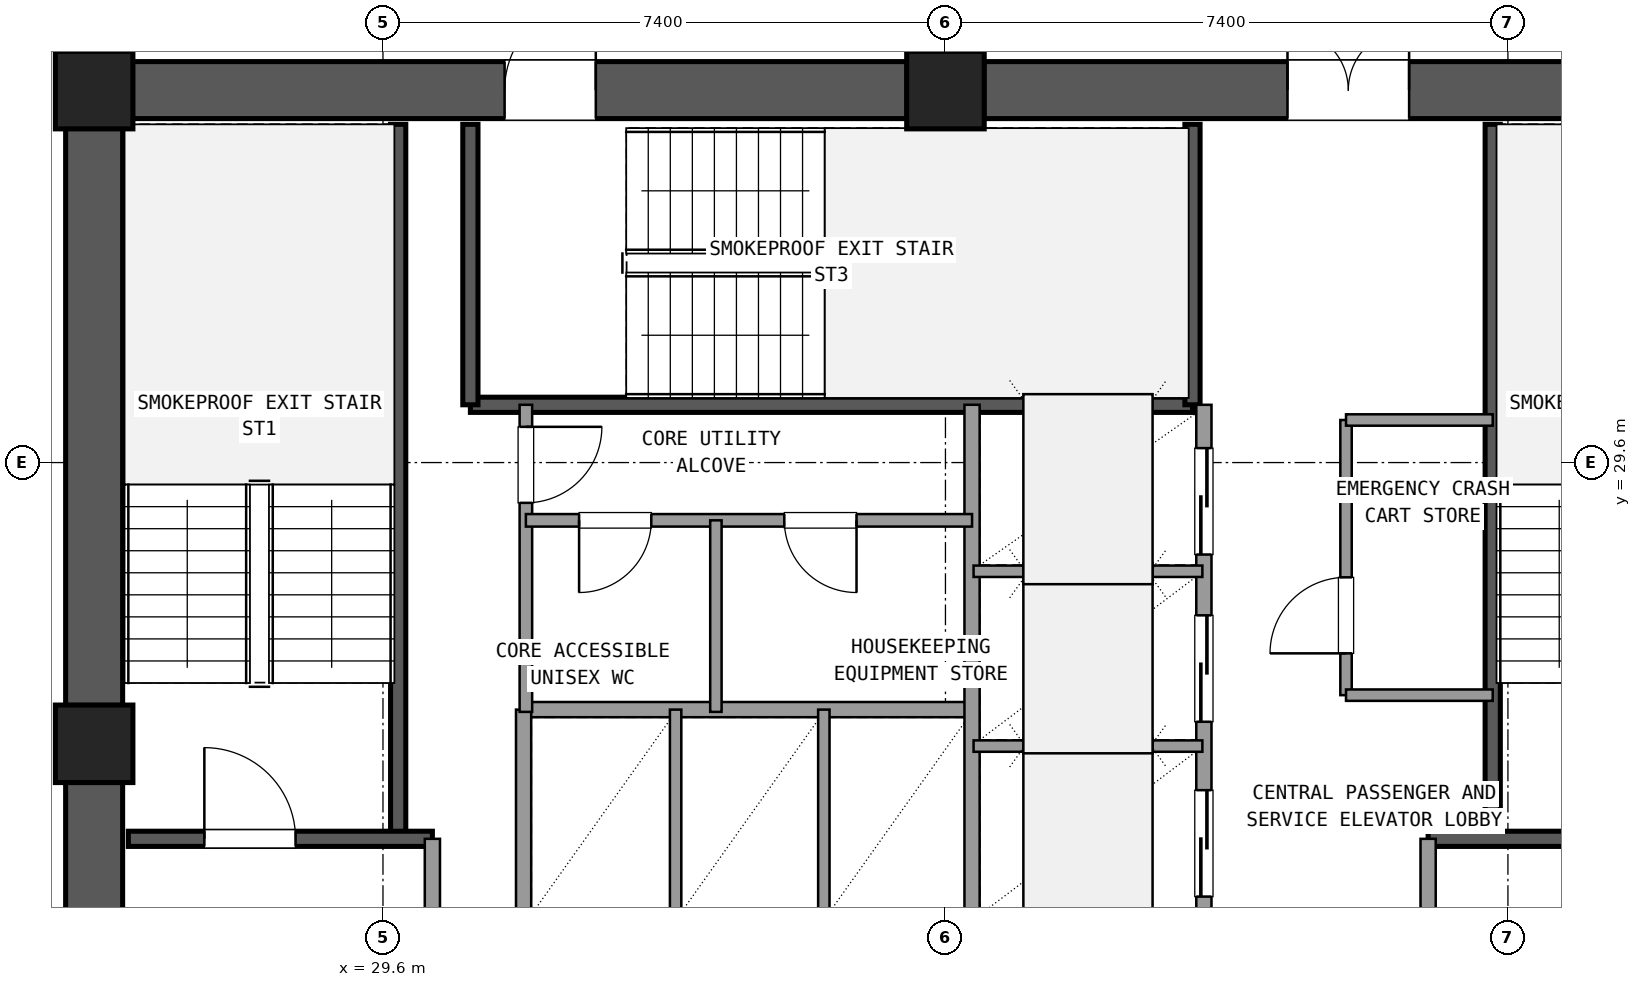
"""IFC4 building model, lengths in metres.
Left out: names, types, materials, properties, quantities, classifications, styles, units other than length and angle.
Written with IfcOpenShell. Run it as: python <this file> out.ifc"""

import sys

from ifc_helpers import new_model, si_unit, direction, frame, frame_2d, origin, origin_2d, place, context, subcontext, project, spatial, rectangle, extrude, element, fill, save


model = new_model("IFC4")
c1 = context("Model", 3, precision=1e-05, world=origin(), true_north=direction((0.0, 1.0)))
c2 = subcontext(c1, "Body", "Model", "MODEL_VIEW")
j1 = project(units=[si_unit("LENGTHUNIT", "METRE"), si_unit("PLANEANGLEUNIT", "RADIAN")], contexts=[c1])
p1 = place(None, origin())
s1 = spatial("IfcSite", under=j1, at=p1, CompositionType="ELEMENT")
p2 = place(p1, origin())
s2 = spatial("IfcBuilding", under=s1, at=p2, CompositionType="ELEMENT")
p3 = place(p2, frame((0.0, 0.0, 120.78)))
s3 = spatial("IfcBuildingStorey", under=s2, at=p3, CompositionType="ELEMENT", Elevation=120.78)
for number, where, z_axis, x_axis in (
    (1, (37.0, 34.5, 0.0), (0.0, 0.0, 1.0), (1.0, 0.0, 0.0)),
    (2, (25.8, 34.5, 0.0), (0.0, 0.0, 1.0), (1.0, 0.0, 0.0)),
    (3, (25.8, 25.9, 0.0), (0.0, 0.0, 1.0), (1.0, 0.0, 0.0)),
):
    element("IfcColumn", number, at=place(p3, frame(where, z_axis=z_axis, x_axis=x_axis)), inside=s3, PredefinedType="COLUMN", context=c2, shape_type="SweptSolid", body=[
        extrude(rectangle(XDim=1.02, YDim=1.02, at=origin_2d()), origin(), (0.0, 0.0, 1.0), 3.6),
    ])
p4 = place(p3, frame((47.695, 34.5, 0.0), z_axis=(0.0, 0.0, 1.0), x_axis=(-1.0, 0.0, 0.0)))
e4 = element("IfcWall", 4, at=p4, inside=s3, PredefinedType="SHEAR", context=c2, shape_type="SweptSolid", body=[
    extrude(rectangle(XDim=10.19, YDim=0.75, at=frame_2d((5.095, 0.0))), origin(), (0.0, 0.0, 1.0), 3.3),
])
p5 = place(p4, frame((4.595, 0.0, 0.0)))
e5 = element("IfcOpeningElement", 5, at=p5, cuts=e4, PredefinedType="OPENING", context=c2, shape_type="SweptSolid", body=[
    extrude(rectangle(XDim=1.6, YDim=2.2, at=frame_2d((0.8, 1.1))), frame((0.0, 0.385, 0.0), z_axis=(0.0, -1.0, 0.0), x_axis=(1.0, 0.0, 0.0)), (0.0, 0.0, 1.0), 0.77),
])
p6 = place(p3, frame((36.495, 34.5, 0.0), z_axis=(0.0, 0.0, 1.0), x_axis=(-1.0, 0.0, 0.0)))
e6 = element("IfcWall", 6, at=p6, inside=s3, PredefinedType="SHEAR", context=c2, shape_type="SweptSolid", body=[
    extrude(rectangle(XDim=10.19, YDim=0.75, at=frame_2d((5.095, 0.0))), origin(), (0.0, 0.0, 1.0), 3.3),
])
p7 = place(p6, frame((4.095, 0.0, 0.0)))
e7 = element("IfcOpeningElement", 7, at=p7, cuts=e6, PredefinedType="OPENING", context=c2, shape_type="SweptSolid", body=[
    extrude(rectangle(XDim=1.2, YDim=2.15, at=frame_2d((0.6, 1.075))), frame((0.0, 0.385, 0.0), z_axis=(0.0, -1.0, 0.0), x_axis=(1.0, 0.0, 0.0)), (0.0, 0.0, 1.0), 0.77),
])
p8 = place(p3, frame((25.8, 33.995, 0.0), z_axis=(0.0, 0.0, 1.0), x_axis=(0.0, -1.0, 0.0)))
e8 = element("IfcWall", 8, at=p8, inside=s3, PredefinedType="SHEAR", context=c2, shape_type="SweptSolid", body=[
    extrude(rectangle(XDim=7.59, YDim=0.75, at=frame_2d((3.795, 0.0))), origin(), (0.0, 0.0, 1.0), 3.3),
])
p9 = place(p3, frame((25.8, 25.395, 0.0), z_axis=(0.0, 0.0, 1.0), x_axis=(0.0, -1.0, 0.0)))
e9 = element("IfcWall", 9, at=p9, inside=s3, PredefinedType="SHEAR", context=c2, shape_type="SweptSolid", body=[
    extrude(rectangle(XDim=7.59, YDim=0.75, at=frame_2d((3.795, 0.0))), origin(), (0.0, 0.0, 1.0), 3.3),
])
p10 = place(p9, frame((2.145, 0.0, 0.0)))
e10 = element("IfcOpeningElement", 10, at=p10, cuts=e9, PredefinedType="OPENING", context=c2, shape_type="SweptSolid", body=[
    extrude(rectangle(XDim=1.2, YDim=2.15, at=frame_2d((0.6, 1.075))), frame((0.0, 0.385, 0.0), z_axis=(0.0, -1.0, 0.0), x_axis=(1.0, 0.0, 0.0)), (0.0, 0.0, 1.0), 0.77),
])
p11 = place(p3, frame((29.8, 24.65, 0.0), z_axis=(0.0, 0.0, 1.0), x_axis=(0.0, 1.0, 0.0)))
e11 = element("IfcWall", 11, at=p11, inside=s3, PredefinedType="SHEAR", context=c2, shape_type="SweptSolid", body=[
    extrude(rectangle(XDim=9.4, YDim=0.2, at=frame_2d((4.7, 0.0))), origin(), (0.0, 0.0, 1.0), 3.3),
])
p12 = place(p3, frame((26.25, 24.65, 0.0), z_axis=(0.0, 0.0, 1.0), x_axis=(1.0, 0.0, 0.0)))
e12 = element("IfcWall", 12, at=p12, inside=s3, PredefinedType="SHEAR", context=c2, shape_type="SweptSolid", body=[
    extrude(rectangle(XDim=4.0, YDim=0.2, at=frame_2d((2.0, 0.0))), origin(), (0.0, 0.0, 1.0), 3.3),
])
p13 = place(p12, frame((1.0, 0.0, 0.0)))
e13 = element("IfcOpeningElement", 13, at=p13, cuts=e12, PredefinedType="OPENING", context=c2, shape_type="SweptSolid", body=[
    extrude(rectangle(XDim=1.2, YDim=2.15, at=frame_2d((0.6, 1.075))), frame((0.0, 0.11, 0.0), z_axis=(0.0, -1.0, 0.0), x_axis=(1.0, 0.0, 0.0)), (0.0, 0.0, 1.0), 0.22),
])
p14 = place(p3, frame((44.2, 24.65, 0.0), z_axis=(0.0, 0.0, 1.0), x_axis=(0.0, 1.0, 0.0)))
e14 = element("IfcWall", 14, at=p14, inside=s3, PredefinedType="SHEAR", context=c2, shape_type="SweptSolid", body=[
    extrude(rectangle(XDim=9.4, YDim=0.2, at=frame_2d((4.7, 0.0))), origin(), (0.0, 0.0, 1.0), 3.3),
])
p15 = place(p3, frame((43.35, 24.65, 0.0), z_axis=(0.0, 0.0, 1.0), x_axis=(1.0, 0.0, 0.0)))
e15 = element("IfcWall", 15, at=p15, inside=s3, PredefinedType="SHEAR", context=c2, shape_type="SweptSolid", body=[
    extrude(rectangle(XDim=4.4, YDim=0.2, at=frame_2d((2.2, 0.0))), origin(), (0.0, 0.0, 1.0), 3.3),
])
p16 = place(p15, frame((2.0, 0.0, 0.0)))
e16 = element("IfcOpeningElement", 16, at=p16, cuts=e15, PredefinedType="OPENING", context=c2, shape_type="SweptSolid", body=[
    extrude(rectangle(XDim=1.2, YDim=2.15, at=frame_2d((0.6, 1.075))), frame((0.0, 0.11, 0.0), z_axis=(0.0, -1.0, 0.0), x_axis=(1.0, 0.0, 0.0)), (0.0, 0.0, 1.0), 0.22),
])
p17 = place(p3, frame((30.75, 30.36, 0.0), z_axis=(0.0, 0.0, 1.0), x_axis=(1.0, 0.0, 0.0)))
e17 = element("IfcWall", 17, at=p17, inside=s3, PredefinedType="SHEAR", context=c2, shape_type="SweptSolid", body=[
    extrude(rectangle(XDim=9.5, YDim=0.2, at=frame_2d((4.75, 0.0))), origin(), (0.0, 0.0, 1.0), 3.3),
])
for number, where, z_axis, x_axis in (
    (18, (30.75, 30.36, 0.0), (0.0, 0.0, 1.0), (0.0, 1.0, 0.0)),
    (19, (40.25, 30.36, 0.0), (0.0, 0.0, 1.0), (0.0, 1.0, 0.0)),
):
    element("IfcWall", number, at=place(p3, frame(where, z_axis=z_axis, x_axis=x_axis)), inside=s3, PredefinedType="SHEAR", context=c2, shape_type="SweptSolid", body=[
        extrude(rectangle(XDim=3.69, YDim=0.2, at=frame_2d((1.845, 0.0))), origin(), (0.0, 0.0, 1.0), 3.3),
    ])
p18 = place(p3, frame((30.25, 17.75, 0.0), z_axis=(0.0, 0.0, 1.0), x_axis=(0.0, 1.0, 0.0)))
e20 = element("IfcWall", 20, at=p18, inside=s3, PredefinedType="SOLIDWALL", context=c2, shape_type="SweptSolid", body=[
    extrude(rectangle(XDim=6.9, YDim=0.2, at=frame_2d((3.45, 0.0))), origin(), (0.0, 0.0, 1.0), 2.59),
])
p19 = place(p18, frame((4.15, 0.0, 0.0)))
e21 = element("IfcOpeningElement", 21, at=p19, cuts=e20, PredefinedType="OPENING", context=c2, shape_type="SweptSolid", body=[
    extrude(rectangle(XDim=1.2, YDim=2.15, at=frame_2d((0.6, 1.075))), frame((0.0, 0.11, 0.0), z_axis=(0.0, -1.0, 0.0), x_axis=(1.0, 0.0, 0.0)), (0.0, 0.0, 1.0), 0.22),
])
p20 = place(p3, frame((43.35, 17.75, 0.0), z_axis=(0.0, 0.0, 1.0), x_axis=(0.0, 1.0, 0.0)))
e22 = element("IfcWall", 22, at=p20, inside=s3, PredefinedType="SOLIDWALL", context=c2, shape_type="SweptSolid", body=[
    extrude(rectangle(XDim=6.9, YDim=0.2, at=frame_2d((3.45, 0.0))), origin(), (0.0, 0.0, 1.0), 2.59),
])
p21 = place(p20, frame((4.15, 0.0, 0.0)))
e23 = element("IfcOpeningElement", 23, at=p21, cuts=e22, PredefinedType="OPENING", context=c2, shape_type="SweptSolid", body=[
    extrude(rectangle(XDim=1.2, YDim=2.15, at=frame_2d((0.6, 1.075))), frame((0.0, 0.11, 0.0), z_axis=(0.0, -1.0, 0.0), x_axis=(1.0, 0.0, 0.0)), (0.0, 0.0, 1.0), 0.22),
])
p22 = place(p3, frame((31.45, 26.35, 0.0), z_axis=(0.0, 0.0, 1.0), x_axis=(1.0, 0.0, 0.0)))
e24 = element("IfcWall", 24, at=p22, inside=s3, PredefinedType="SOLIDWALL", context=c2, shape_type="SweptSolid", body=[
    extrude(rectangle(XDim=5.9, YDim=0.2, at=frame_2d((2.95, 0.0))), origin(), (0.0, 0.0, 1.0), 2.59),
])
p23 = place(p3, frame((31.45, 23.54, 0.0), z_axis=(0.0, 0.0, 1.0), x_axis=(0.0, 1.0, 0.0)))
e25 = element("IfcWall", 25, at=p23, inside=s3, PredefinedType="SOLIDWALL", context=c2, shape_type="SweptSolid", body=[
    extrude(rectangle(XDim=2.81, YDim=0.2, at=frame_2d((1.405, 0.0))), origin(), (0.0, 0.0, 1.0), 2.59),
])
for number, where, z_axis, x_axis in (
    (26, (33.45, 23.54, 0.0), (0.0, 0.0, 1.0), (0.0, 1.0, 0.0)),
    (27, (35.4, 23.54, 0.0), (0.0, 0.0, 1.0), (0.0, 1.0, 0.0)),
):
    element("IfcWall", number, at=place(p3, frame(where, z_axis=z_axis, x_axis=x_axis)), inside=s3, PredefinedType="PARTITIONING", context=c2, shape_type="SweptSolid", body=[
        extrude(rectangle(XDim=2.81, YDim=0.15, at=frame_2d((1.405, 0.0))), origin(), (0.0, 0.0, 1.0), 2.59),
    ])
p24 = place(p3, frame((37.35, 23.54, 0.0), z_axis=(0.0, 0.0, 1.0), x_axis=(0.0, 1.0, 0.0)))
e28 = element("IfcWall", 28, at=p24, inside=s3, PredefinedType="SOLIDWALL", context=c2, shape_type="SweptSolid", body=[
    extrude(rectangle(XDim=6.82, YDim=0.2, at=frame_2d((3.41, 0.0))), origin(), (0.0, 0.0, 1.0), 2.59),
])
p25 = place(p3, frame((40.4, 23.54, 0.0), z_axis=(0.0, 0.0, 1.0), x_axis=(0.0, 1.0, 0.0)))
e29 = element("IfcWall", 29, at=p25, inside=s3, PredefinedType="SOLIDWALL", context=c2, shape_type="SweptSolid", body=[
    extrude(rectangle(XDim=6.82, YDim=0.2, at=frame_2d((3.41, 0.0))), origin(), (0.0, 0.0, 1.0), 2.59),
])
p26 = place(p25, frame((0.35, 0.0, 0.0)))
e30 = element("IfcOpeningElement", 30, at=p26, cuts=e29, PredefinedType="OPENING", context=c2, shape_type="SweptSolid", body=[
    extrude(rectangle(XDim=1.4, YDim=2.2, at=frame_2d((0.7, 1.1))), frame((0.0, 0.11, 0.0), z_axis=(0.0, -1.0, 0.0), x_axis=(1.0, 0.0, 0.0)), (0.0, 0.0, 1.0), 0.22),
])
p27 = place(p25, frame((2.65, 0.0, 0.0)))
e31 = element("IfcOpeningElement", 31, at=p27, cuts=e29, PredefinedType="OPENING", context=c2, shape_type="SweptSolid", body=[
    extrude(rectangle(XDim=1.4, YDim=2.2, at=frame_2d((0.7, 1.1))), frame((0.0, 0.11, 0.0), z_axis=(0.0, -1.0, 0.0), x_axis=(1.0, 0.0, 0.0)), (0.0, 0.0, 1.0), 0.22),
])
p28 = place(p25, frame((4.85, 0.0, 0.0)))
e32 = element("IfcOpeningElement", 32, at=p28, cuts=e29, PredefinedType="OPENING", context=c2, shape_type="SweptSolid", body=[
    extrude(rectangle(XDim=1.4, YDim=2.2, at=frame_2d((0.7, 1.1))), frame((0.0, 0.11, 0.0), z_axis=(0.0, -1.0, 0.0), x_axis=(1.0, 0.0, 0.0)), (0.0, 0.0, 1.0), 0.22),
])
for number, where, z_axis, x_axis in (
    (33, (37.37, 25.87, 0.0), (0.0, 0.0, 1.0), (1.0, 0.0, 0.0)),
    (34, (37.37, 28.17, 0.0), (0.0, 0.0, 1.0), (1.0, 0.0, 0.0)),
):
    element("IfcWall", number, at=place(p3, frame(where, z_axis=z_axis, x_axis=x_axis)), inside=s3, PredefinedType="PARTITIONING", context=c2, shape_type="SweptSolid", body=[
        extrude(rectangle(XDim=3.01, YDim=0.15, at=frame_2d((1.505, 0.0))), origin(), (0.0, 0.0, 1.0), 2.59),
    ])
p29 = place(p3, frame((42.27, 26.54, 0.0), z_axis=(0.0, 0.0, 1.0), x_axis=(0.0, 1.0, 0.0)))
e35 = element("IfcWall", 35, at=p29, inside=s3, PredefinedType="PARTITIONING", context=c2, shape_type="SweptSolid", body=[
    extrude(rectangle(XDim=3.62, YDim=0.15, at=frame_2d((1.81, 0.0))), origin(), (0.0, 0.0, 1.0), 2.59),
])
p30 = place(p29, frame((0.55, 0.0, 0.0)))
e36 = element("IfcOpeningElement", 36, at=p30, cuts=e35, PredefinedType="OPENING", context=c2, shape_type="SweptSolid", body=[
    extrude(rectangle(XDim=1.0, YDim=2.15, at=frame_2d((0.5, 1.075))), frame((0.0, 0.085, 0.0), z_axis=(0.0, -1.0, 0.0), x_axis=(1.0, 0.0, 0.0)), (0.0, 0.0, 1.0), 0.17),
])
for number, where, z_axis, x_axis in (
    (37, (42.27, 26.54, 0.0), (0.0, 0.0, 1.0), (1.0, 0.0, 0.0)),
    (38, (42.27, 30.16, 0.0), (0.0, 0.0, 1.0), (1.0, 0.0, 0.0)),
):
    element("IfcWall", number, at=place(p3, frame(where, z_axis=z_axis, x_axis=x_axis)), inside=s3, PredefinedType="PARTITIONING", context=c2, shape_type="SweptSolid", body=[
        extrude(rectangle(XDim=1.93, YDim=0.15, at=frame_2d((0.965, 0.0))), origin(), (0.0, 0.0, 1.0), 2.59),
    ])
p31 = place(p3, frame((31.48, 26.32, 0.0), z_axis=(0.0, 0.0, 1.0), x_axis=(0.0, 1.0, 0.0)))
e39 = element("IfcWall", 39, at=p31, inside=s3, PredefinedType="PLUMBINGWALL", context=c2, shape_type="SweptSolid", body=[
    extrude(rectangle(XDim=4.04, YDim=0.165, at=frame_2d((2.02, 0.0))), origin(), (0.0, 0.0, 1.0), 2.59),
])
p32 = place(p31, frame((2.75, 0.0, 0.0)))
e40 = element("IfcOpeningElement", 40, at=p32, cuts=e39, PredefinedType="OPENING", context=c2, shape_type="SweptSolid", body=[
    extrude(rectangle(XDim=1.0, YDim=2.15, at=frame_2d((0.5, 1.075))), frame((0.0, 0.093, 0.0), z_axis=(0.0, -1.0, 0.0), x_axis=(1.0, 0.0, 0.0)), (0.0, 0.0, 1.0), 0.185),
])
p33 = place(p3, frame((31.48, 28.84, 0.0), z_axis=(0.0, 0.0, 1.0), x_axis=(1.0, 0.0, 0.0)))
e41 = element("IfcWall", 41, at=p33, inside=s3, PredefinedType="PLUMBINGWALL", context=c2, shape_type="SweptSolid", body=[
    extrude(rectangle(XDim=5.87, YDim=0.165, at=frame_2d((2.935, 0.0))), origin(), (0.0, 0.0, 1.0), 2.59),
])
p34 = place(p33, frame((0.7, 0.0, 0.0)))
e42 = element("IfcOpeningElement", 42, at=p34, cuts=e41, PredefinedType="OPENING", context=c2, shape_type="SweptSolid", body=[
    extrude(rectangle(XDim=0.95, YDim=2.1, at=frame_2d((0.475, 1.05))), frame((0.0, 0.093, 0.0), z_axis=(0.0, -1.0, 0.0), x_axis=(1.0, 0.0, 0.0)), (0.0, 0.0, 1.0), 0.185),
])
p35 = place(p33, frame((3.4, 0.0, 0.0)))
e43 = element("IfcOpeningElement", 43, at=p35, cuts=e41, PredefinedType="OPENING", context=c2, shape_type="SweptSolid", body=[
    extrude(rectangle(XDim=0.95, YDim=2.1, at=frame_2d((0.475, 1.05))), frame((0.0, 0.093, 0.0), z_axis=(0.0, -1.0, 0.0), x_axis=(1.0, 0.0, 0.0)), (0.0, 0.0, 1.0), 0.185),
])
p36 = place(p3, frame((33.98, 26.32, 0.0), z_axis=(0.0, 0.0, 1.0), x_axis=(0.0, 1.0, 0.0)))
e44 = element("IfcWall", 44, at=p36, inside=s3, PredefinedType="PARTITIONING", context=c2, shape_type="SweptSolid", body=[
    extrude(rectangle(XDim=2.52, YDim=0.15, at=frame_2d((1.26, 0.0))), origin(), (0.0, 0.0, 1.0), 2.59),
])
p37 = place(p3, frame((37.0, 34.95, 0.0), z_axis=(0.0, 0.0, 1.0), x_axis=(0.0, 1.0, 0.0)))
e45 = element("IfcWall", 45, at=p37, inside=s3, PredefinedType="PARTITIONING", context=c2, shape_type="SweptSolid", body=[
    extrude(rectangle(XDim=3.21, YDim=0.18, at=frame_2d((1.605, 0.0))), origin(), (0.0, 0.0, 1.0), 2.59),
])
p38 = place(p37, frame((0.605, 0.0, 0.0)))
e46 = element("IfcOpeningElement", 46, at=p38, cuts=e45, PredefinedType="OPENING", context=c2, shape_type="SweptSolid", body=[
    extrude(rectangle(XDim=2.0, YDim=2.2, at=frame_2d((1.0, 1.1))), frame((0.0, 0.1, 0.0), z_axis=(0.0, -1.0, 0.0), x_axis=(1.0, 0.0, 0.0)), (0.0, 0.0, 1.0), 0.2),
])
p39 = place(p13, origin())
e47 = element("IfcDoor", 47, at=p39, inside=s3, OperationType="SINGLE_SWING_LEFT", PredefinedType="DOOR", context=c2, shape_type="SweptSolid", body=[
    extrude(rectangle(XDim=1.2, YDim=2.15, at=frame_2d((0.6, 1.075))), frame((0.0, 0.025, 0.0), z_axis=(0.0, -1.0, 0.0), x_axis=(1.0, 0.0, 0.0)), (0.0, 0.0, 1.0), 0.05),
])
fill(e13, e47)
p40 = place(p5, frame((1.6, 0.0, 0.0), z_axis=(0.0, 0.0, 1.0), x_axis=(-1.0, 0.0, 0.0)))
e48 = element("IfcDoor", 48, at=p40, inside=s3, OperationType="DOUBLE_DOOR_SINGLE_SWING", PredefinedType="DOOR", context=c2, shape_type="SweptSolid", body=[
    extrude(rectangle(XDim=1.6, YDim=2.2, at=frame_2d((0.8, 1.1))), frame((0.0, 0.025, 0.0), z_axis=(0.0, -1.0, 0.0), x_axis=(1.0, 0.0, 0.0)), (0.0, 0.0, 1.0), 0.05),
])
fill(e5, e48)
p41 = place(p7, frame((1.2, 0.0, 0.0), z_axis=(0.0, 0.0, 1.0), x_axis=(-1.0, 0.0, 0.0)))
e49 = element("IfcDoor", 49, at=p41, inside=s3, OperationType="SINGLE_SWING_LEFT", PredefinedType="DOOR", context=c2, shape_type="SweptSolid", body=[
    extrude(rectangle(XDim=1.2, YDim=2.15, at=frame_2d((0.6, 1.075))), frame((0.0, 0.025, 0.0), z_axis=(0.0, -1.0, 0.0), x_axis=(1.0, 0.0, 0.0)), (0.0, 0.0, 1.0), 0.05),
])
fill(e7, e49)
p42 = place(p26, origin())
e50 = element("IfcDoor", 50, at=p42, inside=s3, OperationType="SLIDING_TO_LEFT", PredefinedType="DOOR", context=c2, shape_type="SweptSolid", body=[
    extrude(rectangle(XDim=1.4, YDim=2.2, at=frame_2d((0.7, 1.1))), frame((0.0, 0.025, 0.0), z_axis=(0.0, -1.0, 0.0), x_axis=(1.0, 0.0, 0.0)), (0.0, 0.0, 1.0), 0.05),
])
fill(e30, e50)
p43 = place(p27, origin())
e51 = element("IfcDoor", 51, at=p43, inside=s3, OperationType="SLIDING_TO_LEFT", PredefinedType="DOOR", context=c2, shape_type="SweptSolid", body=[
    extrude(rectangle(XDim=1.4, YDim=2.2, at=frame_2d((0.7, 1.1))), frame((0.0, 0.025, 0.0), z_axis=(0.0, -1.0, 0.0), x_axis=(1.0, 0.0, 0.0)), (0.0, 0.0, 1.0), 0.05),
])
fill(e31, e51)
p44 = place(p28, origin())
e52 = element("IfcDoor", 52, at=p44, inside=s3, OperationType="SLIDING_TO_RIGHT", PredefinedType="DOOR", context=c2, shape_type="SweptSolid", body=[
    extrude(rectangle(XDim=1.4, YDim=2.2, at=frame_2d((0.7, 1.1))), frame((0.0, 0.025, 0.0), z_axis=(0.0, -1.0, 0.0), x_axis=(1.0, 0.0, 0.0)), (0.0, 0.0, 1.0), 0.05),
])
fill(e32, e52)
p45 = place(p30, origin())
e53 = element("IfcDoor", 53, at=p45, inside=s3, OperationType="SINGLE_SWING_LEFT", PredefinedType="DOOR", context=c2, shape_type="SweptSolid", body=[
    extrude(rectangle(XDim=1.0, YDim=2.15, at=frame_2d((0.5, 1.075))), frame((0.0, 0.025, 0.0), z_axis=(0.0, -1.0, 0.0), x_axis=(1.0, 0.0, 0.0)), (0.0, 0.0, 1.0), 0.05),
])
fill(e36, e53)
p46 = place(p32, frame((1.0, 0.0, 0.0), z_axis=(0.0, 0.0, 1.0), x_axis=(-1.0, 0.0, 0.0)))
e54 = element("IfcDoor", 54, at=p46, inside=s3, OperationType="SINGLE_SWING_RIGHT", PredefinedType="DOOR", context=c2, shape_type="SweptSolid", body=[
    extrude(rectangle(XDim=1.0, YDim=2.15, at=frame_2d((0.5, 1.075))), frame((0.0, 0.025, 0.0), z_axis=(0.0, -1.0, 0.0), x_axis=(1.0, 0.0, 0.0)), (0.0, 0.0, 1.0), 0.05),
])
fill(e40, e54)
p47 = place(p34, frame((0.95, 0.0, 0.0), z_axis=(0.0, 0.0, 1.0), x_axis=(-1.0, 0.0, 0.0)))
e55 = element("IfcDoor", 55, at=p47, inside=s3, OperationType="SINGLE_SWING_LEFT", PredefinedType="DOOR", context=c2, shape_type="SweptSolid", body=[
    extrude(rectangle(XDim=0.95, YDim=2.1, at=frame_2d((0.475, 1.05))), frame((0.0, 0.025, 0.0), z_axis=(0.0, -1.0, 0.0), x_axis=(1.0, 0.0, 0.0)), (0.0, 0.0, 1.0), 0.05),
])
fill(e42, e55)
p48 = place(p35, frame((0.95, 0.0, 0.0), z_axis=(0.0, 0.0, 1.0), x_axis=(-1.0, 0.0, 0.0)))
e56 = element("IfcDoor", 56, at=p48, inside=s3, OperationType="SINGLE_SWING_RIGHT", PredefinedType="DOOR", context=c2, shape_type="SweptSolid", body=[
    extrude(rectangle(XDim=0.95, YDim=2.1, at=frame_2d((0.475, 1.05))), frame((0.0, 0.025, 0.0), z_axis=(0.0, -1.0, 0.0), x_axis=(1.0, 0.0, 0.0)), (0.0, 0.0, 1.0), 0.05),
])
fill(e43, e56)
save(model, sys.argv[1])
